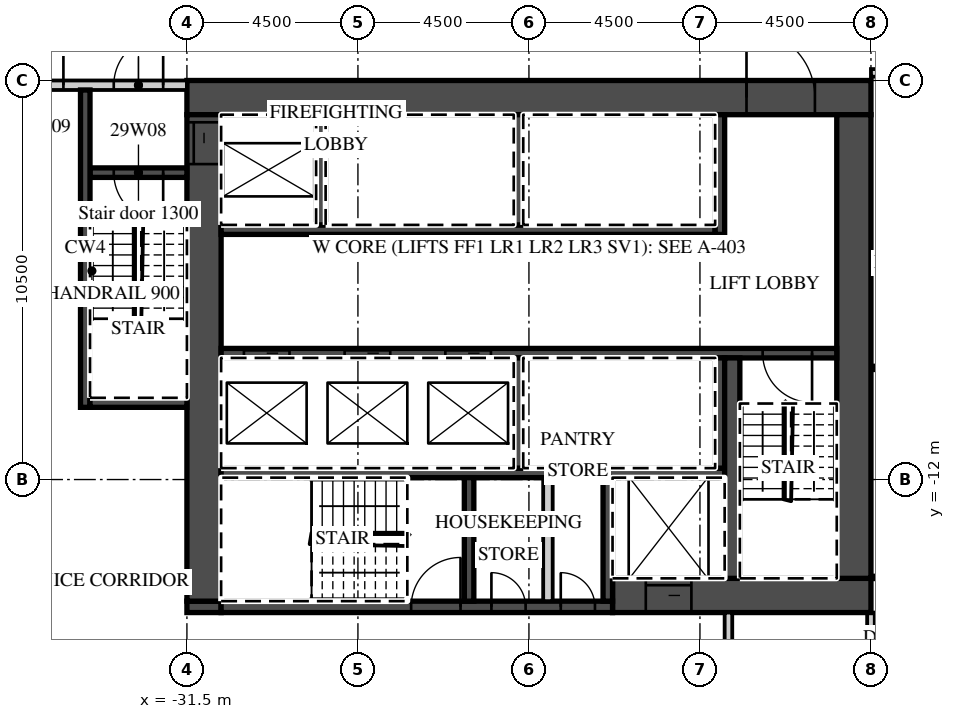
"""IFC4 building model, lengths in metres.
Left out: names, types, materials, properties, quantities, classifications, styles, units other than length and angle.
Written with IfcOpenShell. Run it as: python <this file> out.ifc"""

import sys

from ifc_helpers import new_model, si_unit, direction, frame, frame_2d, origin, place, context, subcontext, project, spatial, rectangle, extrude, element, fill, save


model = new_model("IFC4")
c1 = context("Model", 3, precision=1e-05, world=origin(), true_north=direction((0.0, 1.0)))
c2 = subcontext(c1, "Body", "Model", "MODEL_VIEW")
j1 = project(units=[si_unit("LENGTHUNIT", "METRE"), si_unit("PLANEANGLEUNIT", "RADIAN")], contexts=[c1])
p1 = place(None, origin())
s1 = spatial("IfcSite", under=j1, at=p1, CompositionType="ELEMENT")
p2 = place(p1, origin())
s2 = spatial("IfcBuilding", under=s1, at=p2, CompositionType="ELEMENT")
p3 = place(p2, frame((0.0, 0.0, 130.6)))
s3 = spatial("IfcBuildingStorey", under=s2, at=p3, CompositionType="ELEMENT", Elevation=130.6)
p4 = place(p3, frame((-13.5, -22.232, 0.0), z_axis=(0.0, 0.0, 1.0), x_axis=(0.0, 1.0, 0.0)))
e1 = element("IfcWall", 1, at=p4, inside=s3, PredefinedType="PARTITIONING", context=c2, shape_type="SweptSolid", body=[
    extrude(rectangle(XDim=6.732, YDim=0.2, at=frame_2d((3.366, 0.0))), origin(), (0.0, 0.0, 1.0), 3.02),
])
p5 = place(p3, frame((-13.5, -1.3, 0.0), z_axis=(0.0, 0.0, 1.0), x_axis=(1.0, 0.0, 0.0)))
e2 = element("IfcWall", 2, at=p5, inside=s3, PredefinedType="PARTITIONING", context=c2, shape_type="SweptSolid", body=[
    extrude(rectangle(XDim=60.932, YDim=0.2, at=frame_2d((30.466, 0.0))), origin(), (0.0, 0.0, 1.0), 3.02),
])
p6 = place(p5, frame((2.925, 0.0, 0.0)))
e3 = element("IfcOpeningElement", 3, at=p6, cuts=e2, PredefinedType="OPENING", context=c2, shape_type="SweptSolid", body=[
    extrude(rectangle(XDim=1.0, YDim=2.1, at=frame_2d((0.5, 1.05))), frame((0.0, 0.11, 0.0), z_axis=(0.0, -1.0, 0.0), x_axis=(1.0, 0.0, 0.0)), (0.0, 0.0, 1.0), 0.22),
])
p7 = place(p5, frame((9.863, 0.0, 0.0)))
e4 = element("IfcOpeningElement", 4, at=p7, cuts=e2, PredefinedType="OPENING", context=c2, shape_type="SweptSolid", body=[
    extrude(rectangle(XDim=1.2, YDim=2.1, at=frame_2d((0.6, 1.05))), frame((0.0, 0.11, 0.0), z_axis=(0.0, -1.0, 0.0), x_axis=(1.0, 0.0, 0.0)), (0.0, 0.0, 1.0), 0.22),
])
p8 = place(p5, frame((14.075, 0.0, 0.0)))
e5 = element("IfcOpeningElement", 5, at=p8, cuts=e2, PredefinedType="OPENING", context=c2, shape_type="SweptSolid", body=[
    extrude(rectangle(XDim=1.0, YDim=2.1, at=frame_2d((0.5, 1.05))), frame((0.0, 0.11, 0.0), z_axis=(0.0, -1.0, 0.0), x_axis=(1.0, 0.0, 0.0)), (0.0, 0.0, 1.0), 0.22),
])
p9 = place(p5, frame((18.55, 0.0, 0.0)))
e6 = element("IfcOpeningElement", 6, at=p9, cuts=e2, PredefinedType="OPENING", context=c2, shape_type="SweptSolid", body=[
    extrude(rectangle(XDim=1.0, YDim=2.1, at=frame_2d((0.5, 1.05))), frame((0.0, 0.11, 0.0), z_axis=(0.0, -1.0, 0.0), x_axis=(1.0, 0.0, 0.0)), (0.0, 0.0, 1.0), 0.22),
])
p10 = place(p5, frame((24.938, 0.0, 0.0)))
e7 = element("IfcOpeningElement", 7, at=p10, cuts=e2, PredefinedType="OPENING", context=c2, shape_type="SweptSolid", body=[
    extrude(rectangle(XDim=1.2, YDim=2.1, at=frame_2d((0.6, 1.05))), frame((0.0, 0.11, 0.0), z_axis=(0.0, -1.0, 0.0), x_axis=(1.0, 0.0, 0.0)), (0.0, 0.0, 1.0), 0.22),
])
p11 = place(p5, frame((36.862, 0.0, 0.0)))
e8 = element("IfcOpeningElement", 8, at=p11, cuts=e2, PredefinedType="OPENING", context=c2, shape_type="SweptSolid", body=[
    extrude(rectangle(XDim=1.2, YDim=2.1, at=frame_2d((0.6, 1.05))), frame((0.0, 0.11, 0.0), z_axis=(0.0, -1.0, 0.0), x_axis=(1.0, 0.0, 0.0)), (0.0, 0.0, 1.0), 0.22),
])
p12 = place(p5, frame((41.075, 0.0, 0.0)))
e9 = element("IfcOpeningElement", 9, at=p12, cuts=e2, PredefinedType="OPENING", context=c2, shape_type="SweptSolid", body=[
    extrude(rectangle(XDim=1.0, YDim=2.1, at=frame_2d((0.5, 1.05))), frame((0.0, 0.11, 0.0), z_axis=(0.0, -1.0, 0.0), x_axis=(1.0, 0.0, 0.0)), (0.0, 0.0, 1.0), 0.22),
])
p13 = place(p5, frame((45.55, 0.0, 0.0)))
e10 = element("IfcOpeningElement", 10, at=p13, cuts=e2, PredefinedType="OPENING", context=c2, shape_type="SweptSolid", body=[
    extrude(rectangle(XDim=1.0, YDim=2.1, at=frame_2d((0.5, 1.05))), frame((0.0, 0.11, 0.0), z_axis=(0.0, -1.0, 0.0), x_axis=(1.0, 0.0, 0.0)), (0.0, 0.0, 1.0), 0.22),
])
p14 = place(p5, frame((52.425, 0.0, 0.0)))
e11 = element("IfcOpeningElement", 11, at=p14, cuts=e2, PredefinedType="OPENING", context=c2, shape_type="SweptSolid", body=[
    extrude(rectangle(XDim=1.0, YDim=2.1, at=frame_2d((0.5, 1.05))), frame((0.0, 0.11, 0.0), z_axis=(0.0, -1.0, 0.0), x_axis=(1.0, 0.0, 0.0)), (0.0, 0.0, 1.0), 0.22),
])
p15 = place(p5, frame((56.95, 0.0, 0.0)))
e12 = element("IfcOpeningElement", 12, at=p15, cuts=e2, PredefinedType="OPENING", context=c2, shape_type="SweptSolid", body=[
    extrude(rectangle(XDim=1.0, YDim=2.1, at=frame_2d((0.5, 1.05))), frame((0.0, 0.11, 0.0), z_axis=(0.0, -1.0, 0.0), x_axis=(1.0, 0.0, 0.0)), (0.0, 0.0, 1.0), 0.22),
])
p16 = place(p5, frame((59.882, 0.0, 0.0)))
e13 = element("IfcOpeningElement", 13, at=p16, cuts=e2, PredefinedType="OPENING", context=c2, shape_type="SweptSolid", body=[
    extrude(rectangle(XDim=0.9, YDim=2.1, at=frame_2d((0.45, 1.05))), frame((0.0, 0.11, 0.0), z_axis=(0.0, -1.0, 0.0), x_axis=(1.0, 0.0, 0.0)), (0.0, 0.0, 1.0), 0.22),
])
p17 = place(p3, frame((-31.5, -1.95, 0.0), z_axis=(0.0, 0.0, 1.0), x_axis=(1.0, 0.0, 0.0)))
e14 = element("IfcWall", 14, at=p17, inside=s3, PredefinedType="SHEAR", context=c2, shape_type="SweptSolid", body=[
    extrude(rectangle(XDim=18.0, YDim=0.9, at=frame_2d((9.0, 0.0))), origin(), (0.0, 0.0, 1.0), 3.02),
])
p18 = place(p17, frame((14.725, 0.0, 0.0)))
e15 = element("IfcOpeningElement", 15, at=p18, cuts=e14, PredefinedType="OPENING", context=c2, shape_type="SweptSolid", body=[
    extrude(rectangle(XDim=1.8, YDim=2.1, at=frame_2d((0.9, 1.05))), frame((0.0, 0.46, 0.0), z_axis=(0.0, -1.0, 0.0), x_axis=(1.0, 0.0, 0.0)), (0.0, 0.0, 1.0), 0.92),
])
p19 = place(p3, frame((-20.3, -15.05, 0.0), z_axis=(0.0, 0.0, 1.0), x_axis=(1.0, 0.0, 0.0)))
e16 = element("IfcWall", 16, at=p19, inside=s3, PredefinedType="SHEAR", context=c2, shape_type="SweptSolid", body=[
    extrude(rectangle(XDim=6.8, YDim=0.9, at=frame_2d((3.4, 0.0))), origin(), (0.0, 0.0, 1.0), 3.02),
])
p20 = place(p19, frame((0.875, 0.0, 0.0)))
e17 = element("IfcOpeningElement", 17, at=p20, cuts=e16, PredefinedType="OPENING", context=c2, shape_type="SweptSolid", body=[
    extrude(rectangle(XDim=1.2, YDim=2.1, at=frame_2d((0.6, 1.05))), frame((0.0, 0.46, 0.0), z_axis=(0.0, -1.0, 0.0), x_axis=(1.0, 0.0, 0.0)), (0.0, 0.0, 1.0), 0.92),
])
p21 = place(p3, frame((-31.5, -15.35, 0.0), z_axis=(0.0, 0.0, 1.0), x_axis=(1.0, 0.0, 0.0)))
e18 = element("IfcWall", 18, at=p21, inside=s3, PredefinedType="SHEAR", context=c2, shape_type="SweptSolid", body=[
    extrude(rectangle(XDim=0.9, YDim=0.3, at=frame_2d((0.45, 0.0))), origin(), (0.0, 0.0, 1.0), 3.02),
])
p22 = place(p3, frame((-30.6, -15.35, 0.0), z_axis=(0.0, 0.0, 1.0), x_axis=(1.0, 0.0, 0.0)))
e19 = element("IfcWall", 19, at=p22, inside=s3, PredefinedType="SHEAR", context=c2, shape_type="SweptSolid", body=[
    extrude(rectangle(XDim=10.3, YDim=0.3, at=frame_2d((5.15, 0.0))), origin(), (0.0, 0.0, 1.0), 3.02),
])
p23 = place(p22, frame((5.0, 0.0, 0.0)))
e20 = element("IfcOpeningElement", 20, at=p23, cuts=e19, PredefinedType="OPENING", context=c2, shape_type="SweptSolid", body=[
    extrude(rectangle(XDim=1.3, YDim=2.1, at=frame_2d((0.65, 1.05))), frame((0.0, 0.16, 0.0), z_axis=(0.0, -1.0, 0.0), x_axis=(1.0, 0.0, 0.0)), (0.0, 0.0, 1.0), 0.32),
])
p24 = place(p22, frame((7.113, 0.0, 0.0)))
e21 = element("IfcOpeningElement", 21, at=p24, cuts=e19, PredefinedType="OPENING", context=c2, shape_type="SweptSolid", body=[
    extrude(rectangle(XDim=0.9, YDim=2.1, at=frame_2d((0.45, 1.05))), frame((0.0, 0.16, 0.0), z_axis=(0.0, -1.0, 0.0), x_axis=(1.0, 0.0, 0.0)), (0.0, 0.0, 1.0), 0.32),
])
p25 = place(p22, frame((8.938, 0.0, 0.0)))
e22 = element("IfcOpeningElement", 22, at=p25, cuts=e19, PredefinedType="OPENING", context=c2, shape_type="SweptSolid", body=[
    extrude(rectangle(XDim=0.9, YDim=2.1, at=frame_2d((0.45, 1.05))), frame((0.0, 0.16, 0.0), z_axis=(0.0, -1.0, 0.0), x_axis=(1.0, 0.0, 0.0)), (0.0, 0.0, 1.0), 0.32),
])
p26 = place(p3, frame((-31.05, -15.2, 0.0), z_axis=(0.0, 0.0, 1.0), x_axis=(0.0, 1.0, 0.0)))
e23 = element("IfcWall", 23, at=p26, inside=s3, PredefinedType="SHEAR", context=c2, shape_type="SweptSolid", body=[
    extrude(rectangle(XDim=12.8, YDim=0.9, at=frame_2d((6.4, 0.0))), origin(), (0.0, 0.0, 1.0), 3.02),
])
p27 = place(p26, frame((11.5, 0.0, 0.0)))
e24 = element("IfcOpeningElement", 24, at=p27, cuts=e23, PredefinedType="OPENING", context=c2, shape_type="SweptSolid", body=[
    extrude(rectangle(XDim=1.1, YDim=2.1, at=frame_2d((0.55, 1.05))), frame((0.0, 0.46, 0.0), z_axis=(0.0, -1.0, 0.0), x_axis=(1.0, 0.0, 0.0)), (0.0, 0.0, 1.0), 0.92),
])
p28 = place(p3, frame((-13.95, -14.6, 0.0), z_axis=(0.0, 0.0, 1.0), x_axis=(0.0, 1.0, 0.0)))
e25 = element("IfcWall", 25, at=p28, inside=s3, PredefinedType="SHEAR", context=c2, shape_type="SweptSolid", body=[
    extrude(rectangle(XDim=12.2, YDim=0.9, at=frame_2d((6.1, 0.0))), origin(), (0.0, 0.0, 1.0), 3.02),
])
p29 = place(p3, frame((-30.6, -5.425, 0.0), z_axis=(0.0, 0.0, 1.0), x_axis=(1.0, 0.0, 0.0)))
e26 = element("IfcWall", 26, at=p29, inside=s3, PredefinedType="SHEAR", context=c2, shape_type="SweptSolid", body=[
    extrude(rectangle(XDim=13.0, YDim=0.25, at=frame_2d((6.5, 0.0))), origin(), (0.0, 0.0, 1.0), 3.02),
])
p30 = place(p3, frame((-17.475, -5.55, 0.0), z_axis=(0.0, 0.0, 1.0), x_axis=(0.0, 1.0, 0.0)))
e27 = element("IfcWall", 27, at=p30, inside=s3, PredefinedType="SHEAR", context=c2, shape_type="SweptSolid", body=[
    extrude(rectangle(XDim=3.15, YDim=0.25, at=frame_2d((1.575, 0.0))), origin(), (0.0, 0.0, 1.0), 3.02),
])
for number, where, z_axis, x_axis in (
    (28, (-27.975, -5.3, 0.0), (0.0, 0.0, 1.0), (0.0, 1.0, 0.0)),
    (29, (-22.775, -5.3, 0.0), (0.0, 0.0, 1.0), (0.0, 1.0, 0.0)),
):
    element("IfcWall", number, at=place(p3, frame(where, z_axis=z_axis, x_axis=x_axis)), inside=s3, PredefinedType="SHEAR", context=c2, shape_type="SweptSolid", body=[
        extrude(rectangle(XDim=2.9, YDim=0.25, at=frame_2d((1.45, 0.0))), origin(), (0.0, 0.0, 1.0), 3.02),
    ])
p31 = place(p3, frame((-30.6, -8.675, 0.0), z_axis=(0.0, 0.0, 1.0), x_axis=(1.0, 0.0, 0.0)))
e30 = element("IfcWall", 30, at=p31, inside=s3, PredefinedType="SHEAR", context=c2, shape_type="SweptSolid", body=[
    extrude(rectangle(XDim=16.2, YDim=0.25, at=frame_2d((8.1, 0.0))), origin(), (0.0, 0.0, 1.0), 3.02),
])
p32 = place(p31, frame((0.6, 0.0, 0.0)))
e31 = element("IfcOpeningElement", 31, at=p32, cuts=e30, PredefinedType="OPENING", context=c2, shape_type="SweptSolid", body=[
    extrude(rectangle(XDim=1.2, YDim=2.1, at=frame_2d((0.6, 1.05))), frame((0.0, 0.135, 0.0), z_axis=(0.0, -1.0, 0.0), x_axis=(1.0, 0.0, 0.0)), (0.0, 0.0, 1.0), 0.27),
])
p33 = place(p31, frame((3.25, 0.0, 0.0)))
e32 = element("IfcOpeningElement", 32, at=p33, cuts=e30, PredefinedType="OPENING", context=c2, shape_type="SweptSolid", body=[
    extrude(rectangle(XDim=1.2, YDim=2.1, at=frame_2d((0.6, 1.05))), frame((0.0, 0.135, 0.0), z_axis=(0.0, -1.0, 0.0), x_axis=(1.0, 0.0, 0.0)), (0.0, 0.0, 1.0), 0.27),
])
p34 = place(p31, frame((5.9, 0.0, 0.0)))
e33 = element("IfcOpeningElement", 33, at=p34, cuts=e30, PredefinedType="OPENING", context=c2, shape_type="SweptSolid", body=[
    extrude(rectangle(XDim=1.2, YDim=2.1, at=frame_2d((0.6, 1.05))), frame((0.0, 0.135, 0.0), z_axis=(0.0, -1.0, 0.0), x_axis=(1.0, 0.0, 0.0)), (0.0, 0.0, 1.0), 0.27),
])
p35 = place(p31, frame((14.25, 0.0, 0.0)))
e34 = element("IfcOpeningElement", 34, at=p35, cuts=e30, PredefinedType="OPENING", context=c2, shape_type="SweptSolid", body=[
    extrude(rectangle(XDim=1.3, YDim=2.1, at=frame_2d((0.65, 1.05))), frame((0.0, 0.135, 0.0), z_axis=(0.0, -1.0, 0.0), x_axis=(1.0, 0.0, 0.0)), (0.0, 0.0, 1.0), 0.27),
])
p36 = place(p3, frame((-30.6, -11.825, 0.0), z_axis=(0.0, 0.0, 1.0), x_axis=(1.0, 0.0, 0.0)))
e35 = element("IfcWall", 35, at=p36, inside=s3, PredefinedType="SHEAR", context=c2, shape_type="SweptSolid", body=[
    extrude(rectangle(XDim=13.25, YDim=0.25, at=frame_2d((6.625, 0.0))), origin(), (0.0, 0.0, 1.0), 3.02),
])
for number, where, z_axis, x_axis in (
    (36, (-17.475, -11.7, 0.0), (0.0, 0.0, 1.0), (0.0, 1.0, 0.0)),
    (37, (-22.775, -11.7, 0.0), (0.0, 0.0, 1.0), (0.0, 1.0, 0.0)),
):
    element("IfcWall", number, at=place(p3, frame(where, z_axis=z_axis, x_axis=x_axis)), inside=s3, PredefinedType="SHEAR", context=c2, shape_type="SweptSolid", body=[
        extrude(rectangle(XDim=2.9, YDim=0.25, at=frame_2d((1.45, 0.0))), origin(), (0.0, 0.0, 1.0), 3.02),
    ])
p37 = place(p3, frame((-17.15, -14.6, 0.0), z_axis=(0.0, 0.0, 1.0), x_axis=(0.0, 1.0, 0.0)))
e38 = element("IfcWall", 38, at=p37, inside=s3, PredefinedType="SHEAR", context=c2, shape_type="SweptSolid", body=[
    extrude(rectangle(XDim=5.8, YDim=0.4, at=frame_2d((2.9, 0.0))), origin(), (0.0, 0.0, 1.0), 3.02),
])
for number, where, z_axis, x_axis in (
    (39, (-20.425, -15.2, 0.0), (0.0, 0.0, 1.0), (0.0, 1.0, 0.0)),
    (40, (-24.075, -15.2, 0.0), (0.0, 0.0, 1.0), (0.0, 1.0, 0.0)),
):
    element("IfcWall", number, at=place(p3, frame(where, z_axis=z_axis, x_axis=x_axis)), inside=s3, PredefinedType="SHEAR", context=c2, shape_type="SweptSolid", body=[
        extrude(rectangle(XDim=3.25, YDim=0.25, at=frame_2d((1.625, 0.0))), origin(), (0.0, 0.0, 1.0), 3.02),
    ])
p38 = place(p3, frame((-22.0, -15.2, 0.0), z_axis=(0.0, 0.0, 1.0), x_axis=(0.0, 1.0, 0.0)))
e41 = element("IfcWall", 41, at=p38, inside=s3, PredefinedType="PARTITIONING", context=c2, shape_type="SweptSolid", body=[
    extrude(rectangle(XDim=3.25, YDim=0.25, at=frame_2d((1.625, 0.0))), origin(), (0.0, 0.0, 1.0), 3.02),
])
p39 = place(p3, frame((-39.035, -1.625, 0.0), z_axis=(0.0, 0.0, 1.0), x_axis=(1.0, 0.0, 0.0)))
e42 = element("IfcWall", 42, at=p39, inside=s3, PredefinedType="PARTITIONING", context=c2, shape_type="SweptSolid", body=[
    extrude(rectangle(XDim=7.535, YDim=0.25, at=frame_2d((3.768, 0.0))), origin(), (0.0, 0.0, 1.0), 3.02),
])
p40 = place(p39, frame((5.61, 0.0, 0.0)))
e43 = element("IfcOpeningElement", 43, at=p40, cuts=e42, PredefinedType="OPENING", context=c2, shape_type="SweptSolid", body=[
    extrude(rectangle(XDim=1.3, YDim=2.1, at=frame_2d((0.65, 1.05))), frame((0.0, 0.135, 0.0), z_axis=(0.0, -1.0, 0.0), x_axis=(1.0, 0.0, 0.0)), (0.0, 0.0, 1.0), 0.27),
])
p41 = place(p39, frame((3.185, 0.0, 0.0)))
e44 = element("IfcOpeningElement", 44, at=p41, cuts=e42, PredefinedType="OPENING", context=c2, shape_type="SweptSolid", body=[
    extrude(rectangle(XDim=1.1, YDim=2.1, at=frame_2d((0.55, 1.05))), frame((0.0, 0.135, 0.0), z_axis=(0.0, -1.0, 0.0), x_axis=(1.0, 0.0, 0.0)), (0.0, 0.0, 1.0), 0.27),
])
p42 = place(p3, frame((-34.05, -3.925, 0.0), z_axis=(0.0, 0.0, 1.0), x_axis=(1.0, 0.0, 0.0)))
e45 = element("IfcWall", 45, at=p42, inside=s3, PredefinedType="SHEAR", context=c2, shape_type="SweptSolid", body=[
    extrude(rectangle(XDim=2.55, YDim=0.25, at=frame_2d((1.275, 0.0))), origin(), (0.0, 0.0, 1.0), 3.02),
])
p43 = place(p42, frame((0.625, 0.0, 0.0)))
e46 = element("IfcOpeningElement", 46, at=p43, cuts=e45, PredefinedType="OPENING", context=c2, shape_type="SweptSolid", body=[
    extrude(rectangle(XDim=1.3, YDim=2.1, at=frame_2d((0.65, 1.05))), frame((0.0, 0.135, 0.0), z_axis=(0.0, -1.0, 0.0), x_axis=(1.0, 0.0, 0.0)), (0.0, 0.0, 1.0), 0.27),
])
p44 = place(p3, frame((-34.175, -10.1, 0.0), z_axis=(0.0, 0.0, 1.0), x_axis=(0.0, 1.0, 0.0)))
e47 = element("IfcWall", 47, at=p44, inside=s3, PredefinedType="SHEAR", context=c2, shape_type="SweptSolid", body=[
    extrude(rectangle(XDim=8.35, YDim=0.25, at=frame_2d((4.175, 0.0))), origin(), (0.0, 0.0, 1.0), 3.02),
])
p45 = place(p3, frame((-34.05, -9.975, 0.0), z_axis=(0.0, 0.0, 1.0), x_axis=(1.0, 0.0, 0.0)))
e48 = element("IfcWall", 48, at=p45, inside=s3, PredefinedType="SHEAR", context=c2, shape_type="SweptSolid", body=[
    extrude(rectangle(XDim=2.55, YDim=0.25, at=frame_2d((1.275, 0.0))), origin(), (0.0, 0.0, 1.0), 3.02),
])
p46 = place(p3, frame((-17.25, -17.7, 0.0), z_axis=(0.0, 0.0, 1.0), x_axis=(0.0, 1.0, 0.0)))
e49 = element("IfcWall", 49, at=p46, inside=s3, PredefinedType="PARTITIONING", context=c2, shape_type="SweptSolid", body=[
    extrude(rectangle(XDim=2.2, YDim=0.2, at=frame_2d((1.1, 0.0))), origin(), (0.0, 0.0, 1.0), 3.02),
])
p47 = place(p32, origin())
e50 = element("IfcDoor", 50, at=p47, inside=s3, OperationType="SLIDING_TO_LEFT", PredefinedType="DOOR", context=c2, shape_type="SweptSolid", body=[
    extrude(rectangle(XDim=1.2, YDim=2.1, at=frame_2d((0.6, 1.05))), frame((0.0, 0.025, 0.0), z_axis=(0.0, -1.0, 0.0), x_axis=(1.0, 0.0, 0.0)), (0.0, 0.0, 1.0), 0.05),
])
fill(e31, e50)
p48 = place(p33, origin())
e51 = element("IfcDoor", 51, at=p48, inside=s3, OperationType="SLIDING_TO_RIGHT", PredefinedType="DOOR", context=c2, shape_type="SweptSolid", body=[
    extrude(rectangle(XDim=1.2, YDim=2.1, at=frame_2d((0.6, 1.05))), frame((0.0, 0.025, 0.0), z_axis=(0.0, -1.0, 0.0), x_axis=(1.0, 0.0, 0.0)), (0.0, 0.0, 1.0), 0.05),
])
fill(e32, e51)
p49 = place(p34, origin())
e52 = element("IfcDoor", 52, at=p49, inside=s3, OperationType="SLIDING_TO_RIGHT", PredefinedType="DOOR", context=c2, shape_type="SweptSolid", body=[
    extrude(rectangle(XDim=1.2, YDim=2.1, at=frame_2d((0.6, 1.05))), frame((0.0, 0.025, 0.0), z_axis=(0.0, -1.0, 0.0), x_axis=(1.0, 0.0, 0.0)), (0.0, 0.0, 1.0), 0.05),
])
fill(e33, e52)
p50 = place(p20, origin())
e53 = element("IfcDoor", 53, at=p50, inside=s3, OperationType="SLIDING_TO_LEFT", PredefinedType="DOOR", context=c2, shape_type="SweptSolid", body=[
    extrude(rectangle(XDim=1.2, YDim=2.1, at=frame_2d((0.6, 1.05))), frame((0.0, 0.025, 0.0), z_axis=(0.0, -1.0, 0.0), x_axis=(1.0, 0.0, 0.0)), (0.0, 0.0, 1.0), 0.05),
])
fill(e17, e53)
p51 = place(p27, origin())
e54 = element("IfcDoor", 54, at=p51, inside=s3, OperationType="SLIDING_TO_RIGHT", PredefinedType="DOOR", context=c2, shape_type="SweptSolid", body=[
    extrude(rectangle(XDim=1.1, YDim=2.1, at=frame_2d((0.55, 1.05))), frame((0.0, 0.025, 0.0), z_axis=(0.0, -1.0, 0.0), x_axis=(1.0, 0.0, 0.0)), (0.0, 0.0, 1.0), 0.05),
])
fill(e24, e54)
p52 = place(p18, origin())
e55 = element("IfcDoor", 55, at=p52, inside=s3, OperationType="DOUBLE_DOOR_DOUBLE_SWING", PredefinedType="DOOR", context=c2, shape_type="SweptSolid", body=[
    extrude(rectangle(XDim=1.8, YDim=2.1, at=frame_2d((0.9, 1.05))), frame((0.0, 0.025, 0.0), z_axis=(0.0, -1.0, 0.0), x_axis=(1.0, 0.0, 0.0)), (0.0, 0.0, 1.0), 0.05),
])
fill(e15, e55)
p53 = place(p40, origin())
e56 = element("IfcDoor", 56, at=p53, inside=s3, OperationType="SINGLE_SWING_RIGHT", PredefinedType="DOOR", context=c2, shape_type="SweptSolid", body=[
    extrude(rectangle(XDim=1.3, YDim=2.1, at=frame_2d((0.65, 1.05))), frame((0.0, 0.025, 0.0), z_axis=(0.0, -1.0, 0.0), x_axis=(1.0, 0.0, 0.0)), (0.0, 0.0, 1.0), 0.05),
])
fill(e43, e56)
p54 = place(p43, origin())
e57 = element("IfcDoor", 57, at=p54, inside=s3, OperationType="SINGLE_SWING_RIGHT", PredefinedType="DOOR", context=c2, shape_type="SweptSolid", body=[
    extrude(rectangle(XDim=1.3, YDim=2.1, at=frame_2d((0.65, 1.05))), frame((0.0, 0.025, 0.0), z_axis=(0.0, -1.0, 0.0), x_axis=(1.0, 0.0, 0.0)), (0.0, 0.0, 1.0), 0.05),
])
fill(e46, e57)
p55 = place(p41, origin())
e58 = element("IfcDoor", 58, at=p55, inside=s3, OperationType="SINGLE_SWING_RIGHT", PredefinedType="DOOR", context=c2, shape_type="SweptSolid", body=[
    extrude(rectangle(XDim=1.1, YDim=2.1, at=frame_2d((0.55, 1.05))), frame((0.0, 0.025, 0.0), z_axis=(0.0, -1.0, 0.0), x_axis=(1.0, 0.0, 0.0)), (0.0, 0.0, 1.0), 0.05),
])
fill(e44, e58)
p56 = place(p35, origin())
e59 = element("IfcDoor", 59, at=p56, inside=s3, OperationType="SINGLE_SWING_RIGHT", PredefinedType="DOOR", context=c2, shape_type="SweptSolid", body=[
    extrude(rectangle(XDim=1.3, YDim=2.1, at=frame_2d((0.65, 1.05))), frame((0.0, 0.025, 0.0), z_axis=(0.0, -1.0, 0.0), x_axis=(1.0, 0.0, 0.0)), (0.0, 0.0, 1.0), 0.05),
])
fill(e34, e59)
p57 = place(p23, origin())
e60 = element("IfcDoor", 60, at=p57, inside=s3, OperationType="SINGLE_SWING_RIGHT", PredefinedType="DOOR", context=c2, shape_type="SweptSolid", body=[
    extrude(rectangle(XDim=1.3, YDim=2.1, at=frame_2d((0.65, 1.05))), frame((0.0, 0.025, 0.0), z_axis=(0.0, -1.0, 0.0), x_axis=(1.0, 0.0, 0.0)), (0.0, 0.0, 1.0), 0.05),
])
fill(e20, e60)
p58 = place(p24, origin())
e61 = element("IfcDoor", 61, at=p58, inside=s3, OperationType="SINGLE_SWING_LEFT", PredefinedType="DOOR", context=c2, shape_type="SweptSolid", body=[
    extrude(rectangle(XDim=0.9, YDim=2.1, at=frame_2d((0.45, 1.05))), frame((0.0, 0.025, 0.0), z_axis=(0.0, -1.0, 0.0), x_axis=(1.0, 0.0, 0.0)), (0.0, 0.0, 1.0), 0.05),
])
fill(e21, e61)
p59 = place(p25, origin())
e62 = element("IfcDoor", 62, at=p59, inside=s3, OperationType="SINGLE_SWING_LEFT", PredefinedType="DOOR", context=c2, shape_type="SweptSolid", body=[
    extrude(rectangle(XDim=0.9, YDim=2.1, at=frame_2d((0.45, 1.05))), frame((0.0, 0.025, 0.0), z_axis=(0.0, -1.0, 0.0), x_axis=(1.0, 0.0, 0.0)), (0.0, 0.0, 1.0), 0.05),
])
fill(e22, e62)
save(model, sys.argv[1])
